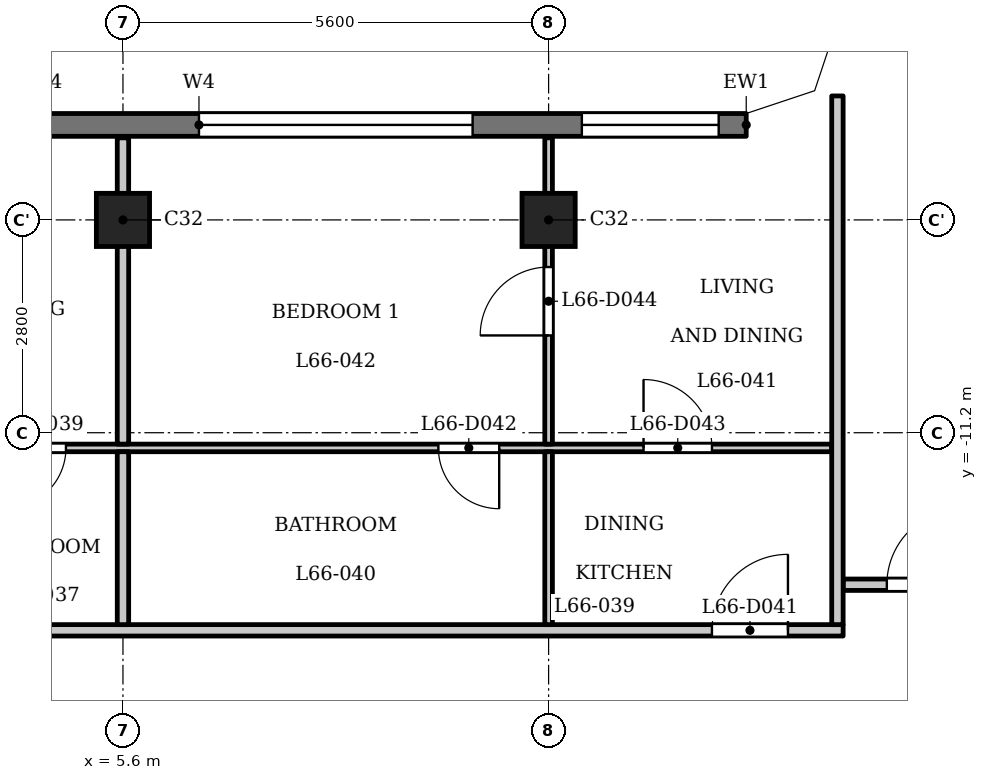
"""IFC4 building model, lengths in metres.
Left out: names, types, materials, properties, quantities, classifications, styles, units other than length and angle.
Written with IfcOpenShell. Run it as: python <this file> out.ifc"""

import sys

from ifc_helpers import new_model, si_unit, direction, frame, frame_2d, origin, origin_2d, place, context, subcontext, project, spatial, polyline, rectangle, outline, extrude, element, fill, save


model = new_model("IFC4")
c1 = context("Model", 3, precision=1e-05, world=origin(), true_north=direction((0.0, 1.0)))
c2 = subcontext(c1, "Body", "Model", "MODEL_VIEW")
j1 = project(units=[si_unit("LENGTHUNIT", "METRE"), si_unit("PLANEANGLEUNIT", "RADIAN")], contexts=[c1])
p1 = place(None, origin())
s1 = spatial("IfcSite", under=j1, at=p1, CompositionType="ELEMENT")
p2 = place(p1, origin())
s2 = spatial("IfcBuilding", under=s1, at=p2, CompositionType="ELEMENT")
p3 = place(p2, frame((0.0, 0.0, 255.7)))
s3 = spatial("IfcBuildingStorey", under=s2, at=p3, CompositionType="ELEMENT", Elevation=255.7)
for number, where, z_axis, x_axis in (
    (1, (5.6, -8.4, 0.0), (0.0, 0.0, 1.0), (1.0, 0.0, 0.0)),
    (2, (11.2, -8.4, 0.0), (0.0, 0.0, 1.0), (1.0, 0.0, 0.0)),
):
    element("IfcColumn", number, at=place(p3, frame(where, z_axis=z_axis, x_axis=x_axis)), inside=s3, PredefinedType="COLUMN", context=c2, shape_type="SweptSolid", body=[
        extrude(rectangle(XDim=0.7, YDim=0.7, at=origin_2d()), origin(), (0.0, 0.0, 1.0), 3.5),
    ])
p4 = place(p3, frame((13.8, -7.15, 0.0), z_axis=(0.0, 0.0, 1.0), x_axis=(-1.0, 0.0, 0.0)))
e3 = element("IfcWall", 3, at=p4, inside=s3, PredefinedType="SOLIDWALL", context=c2, shape_type="SweptSolid", body=[
    extrude(rectangle(XDim=27.6, YDim=0.3, at=frame_2d((13.8, 0.0))), origin(), (0.0, 0.0, 1.0), 3.2),
])
p5 = place(p4, frame((0.363, 0.0, 0.9)))
e4 = element("IfcOpeningElement", 4, at=p5, cuts=e3, PredefinedType="OPENING", context=c2, shape_type="SweptSolid", body=[
    extrude(rectangle(XDim=1.8, YDim=1.25, at=frame_2d((0.9, 0.625))), frame((0.0, 0.16, 0.0), z_axis=(0.0, -1.0, 0.0), x_axis=(1.0, 0.0, 0.0)), (0.0, 0.0, 1.0), 0.32),
])
p6 = place(p4, frame((3.6, 0.0, 1.2)))
e5 = element("IfcOpeningElement", 5, at=p6, cuts=e3, PredefinedType="OPENING", context=c2, shape_type="SweptSolid", body=[
    extrude(rectangle(XDim=3.6, YDim=0.95, at=frame_2d((1.8, 0.475))), frame((0.0, 0.16, 0.0), z_axis=(0.0, -1.0, 0.0), x_axis=(1.0, 0.0, 0.0)), (0.0, 0.0, 1.0), 0.32),
])
p7 = place(p4, frame((9.2, 0.0, 1.2)))
e6 = element("IfcOpeningElement", 6, at=p7, cuts=e3, PredefinedType="OPENING", context=c2, shape_type="SweptSolid", body=[
    extrude(rectangle(XDim=3.6, YDim=0.95, at=frame_2d((1.8, 0.475))), frame((0.0, 0.16, 0.0), z_axis=(0.0, -1.0, 0.0), x_axis=(1.0, 0.0, 0.0)), (0.0, 0.0, 1.0), 0.32),
])
p8 = place(p4, frame((14.8, 0.0, 1.2)))
e7 = element("IfcOpeningElement", 7, at=p8, cuts=e3, PredefinedType="OPENING", context=c2, shape_type="SweptSolid", body=[
    extrude(rectangle(XDim=3.6, YDim=0.95, at=frame_2d((1.8, 0.475))), frame((0.0, 0.16, 0.0), z_axis=(0.0, -1.0, 0.0), x_axis=(1.0, 0.0, 0.0)), (0.0, 0.0, 1.0), 0.32),
])
p9 = place(p4, frame((20.4, 0.0, 1.2)))
e8 = element("IfcOpeningElement", 8, at=p9, cuts=e3, PredefinedType="OPENING", context=c2, shape_type="SweptSolid", body=[
    extrude(rectangle(XDim=3.6, YDim=0.95, at=frame_2d((1.8, 0.475))), frame((0.0, 0.16, 0.0), z_axis=(0.0, -1.0, 0.0), x_axis=(1.0, 0.0, 0.0)), (0.0, 0.0, 1.0), 0.32),
])
p10 = place(p4, frame((25.438, 0.0, 0.9)))
e9 = element("IfcOpeningElement", 9, at=p10, cuts=e3, PredefinedType="OPENING", context=c2, shape_type="SweptSolid", body=[
    extrude(rectangle(XDim=1.8, YDim=1.25, at=frame_2d((0.9, 0.625))), frame((0.0, 0.16, 0.0), z_axis=(0.0, -1.0, 0.0), x_axis=(1.0, 0.0, 0.0)), (0.0, 0.0, 1.0), 0.32),
])
p11 = place(p3, frame((-15.075, -13.8, 0.0), z_axis=(0.0, 0.0, 1.0), x_axis=(1.0, 0.0, 0.0)))
e10 = element("IfcWall", 10, at=p11, inside=s3, PredefinedType="PARTITIONING", context=c2, shape_type="SweptSolid", body=[
    extrude(rectangle(XDim=30.15, YDim=0.15, at=frame_2d((15.075, 0.0))), origin(), (0.0, 0.0, 1.0), 3.2),
])
p12 = place(p11, frame((7.825, 0.0, 0.0)))
e11 = element("IfcOpeningElement", 11, at=p12, cuts=e10, PredefinedType="OPENING", context=c2, shape_type="SweptSolid", body=[
    extrude(rectangle(XDim=1.0, YDim=2.1, at=frame_2d((0.5, 1.05))), frame((0.0, 0.085, 0.0), z_axis=(0.0, -1.0, 0.0), x_axis=(1.0, 0.0, 0.0)), (0.0, 0.0, 1.0), 0.17),
])
p13 = place(p11, frame((11.225, 0.0, 0.0)))
e12 = element("IfcOpeningElement", 12, at=p13, cuts=e10, PredefinedType="OPENING", context=c2, shape_type="SweptSolid", body=[
    extrude(rectangle(XDim=1.0, YDim=2.1, at=frame_2d((0.5, 1.05))), frame((0.0, 0.085, 0.0), z_axis=(0.0, -1.0, 0.0), x_axis=(1.0, 0.0, 0.0)), (0.0, 0.0, 1.0), 0.17),
])
p14 = place(p11, frame((15.575, 0.0, 0.0)))
e13 = element("IfcOpeningElement", 13, at=p14, cuts=e10, PredefinedType="OPENING", context=c2, shape_type="SweptSolid", body=[
    extrude(rectangle(XDim=1.0, YDim=2.1, at=frame_2d((0.5, 1.05))), frame((0.0, 0.085, 0.0), z_axis=(0.0, -1.0, 0.0), x_axis=(1.0, 0.0, 0.0)), (0.0, 0.0, 1.0), 0.17),
])
p15 = place(p11, frame((28.424, 0.0, 0.0)))
e14 = element("IfcOpeningElement", 14, at=p15, cuts=e10, PredefinedType="OPENING", context=c2, shape_type="SweptSolid", body=[
    extrude(rectangle(XDim=1.0, YDim=2.1, at=frame_2d((0.5, 1.05))), frame((0.0, 0.085, 0.0), z_axis=(0.0, -1.0, 0.0), x_axis=(1.0, 0.0, 0.0)), (0.0, 0.0, 1.0), 0.17),
])
p16 = place(p3, frame((15.075, -13.2, 0.0), z_axis=(0.0, 0.0, 1.0), x_axis=(1.0, 0.0, 0.0)))
e15 = element("IfcWall", 15, at=p16, inside=s3, PredefinedType="PARTITIONING", context=c2, shape_type="SweptSolid", body=[
    extrude(rectangle(XDim=2.325, YDim=0.15, at=frame_2d((1.163, 0.0))), origin(), (0.0, 0.0, 1.0), 3.2),
])
p17 = place(p16, frame((0.575, 0.0, 0.0)))
e16 = element("IfcOpeningElement", 16, at=p17, cuts=e15, PredefinedType="OPENING", context=c2, shape_type="SweptSolid", body=[
    extrude(rectangle(XDim=1.0, YDim=2.1, at=frame_2d((0.5, 1.05))), frame((0.0, 0.085, 0.0), z_axis=(0.0, -1.0, 0.0), x_axis=(1.0, 0.0, 0.0)), (0.0, 0.0, 1.0), 0.17),
])
p18 = place(p3, frame((-14.925, -11.4, 0.0), z_axis=(0.0, 0.0, 1.0), x_axis=(1.0, 0.0, 0.0)))
e17 = element("IfcWall", 17, at=p18, inside=s3, PredefinedType="PARTITIONING", context=c2, shape_type="SweptSolid", body=[
    extrude(rectangle(XDim=29.85, YDim=0.1, at=frame_2d((14.925, 0.0))), origin(), (0.0, 0.0, 1.0), 3.2),
])
p19 = place(p18, frame((2.326, 0.0, 0.0)))
e18 = element("IfcOpeningElement", 18, at=p19, cuts=e17, PredefinedType="OPENING", context=c2, shape_type="SweptSolid", body=[
    extrude(rectangle(XDim=0.8, YDim=2.1, at=frame_2d((0.4, 1.05))), frame((0.0, 0.06, 0.0), z_axis=(0.0, -1.0, 0.0), x_axis=(1.0, 0.0, 0.0)), (0.0, 0.0, 1.0), 0.12),
])
p20 = place(p18, frame((6.775, 0.0, 0.0)))
e19 = element("IfcOpeningElement", 19, at=p20, cuts=e17, PredefinedType="OPENING", context=c2, shape_type="SweptSolid", body=[
    extrude(rectangle(XDim=0.9, YDim=2.1, at=frame_2d((0.45, 1.05))), frame((0.0, 0.06, 0.0), z_axis=(0.0, -1.0, 0.0), x_axis=(1.0, 0.0, 0.0)), (0.0, 0.0, 1.0), 0.12),
])
p21 = place(p18, frame((13.375, 0.0, 0.0)))
e20 = element("IfcOpeningElement", 20, at=p21, cuts=e17, PredefinedType="OPENING", context=c2, shape_type="SweptSolid", body=[
    extrude(rectangle(XDim=0.8, YDim=2.1, at=frame_2d((0.4, 1.05))), frame((0.0, 0.06, 0.0), z_axis=(0.0, -1.0, 0.0), x_axis=(1.0, 0.0, 0.0)), (0.0, 0.0, 1.0), 0.12),
])
p22 = place(p18, frame((10.175, 0.0, 0.0)))
e21 = element("IfcOpeningElement", 21, at=p22, cuts=e17, PredefinedType="OPENING", context=c2, shape_type="SweptSolid", body=[
    extrude(rectangle(XDim=0.9, YDim=2.1, at=frame_2d((0.45, 1.05))), frame((0.0, 0.06, 0.0), z_axis=(0.0, -1.0, 0.0), x_axis=(1.0, 0.0, 0.0)), (0.0, 0.0, 1.0), 0.12),
])
p23 = place(p18, frame((18.975, 0.0, 0.0)))
e22 = element("IfcOpeningElement", 22, at=p23, cuts=e17, PredefinedType="OPENING", context=c2, shape_type="SweptSolid", body=[
    extrude(rectangle(XDim=0.8, YDim=2.1, at=frame_2d((0.4, 1.05))), frame((0.0, 0.06, 0.0), z_axis=(0.0, -1.0, 0.0), x_axis=(1.0, 0.0, 0.0)), (0.0, 0.0, 1.0), 0.12),
])
p24 = place(p18, frame((16.525, 0.0, 0.0)))
e23 = element("IfcOpeningElement", 23, at=p24, cuts=e17, PredefinedType="OPENING", context=c2, shape_type="SweptSolid", body=[
    extrude(rectangle(XDim=0.9, YDim=2.1, at=frame_2d((0.45, 1.05))), frame((0.0, 0.06, 0.0), z_axis=(0.0, -1.0, 0.0), x_axis=(1.0, 0.0, 0.0)), (0.0, 0.0, 1.0), 0.12),
])
p25 = place(p18, frame((24.675, 0.0, 0.0)))
e24 = element("IfcOpeningElement", 24, at=p25, cuts=e17, PredefinedType="OPENING", context=c2, shape_type="SweptSolid", body=[
    extrude(rectangle(XDim=0.8, YDim=2.1, at=frame_2d((0.4, 1.05))), frame((0.0, 0.06, 0.0), z_axis=(0.0, -1.0, 0.0), x_axis=(1.0, 0.0, 0.0)), (0.0, 0.0, 1.0), 0.12),
])
p26 = place(p18, frame((27.374, 0.0, 0.0)))
e25 = element("IfcOpeningElement", 25, at=p26, cuts=e17, PredefinedType="OPENING", context=c2, shape_type="SweptSolid", body=[
    extrude(rectangle(XDim=0.9, YDim=2.1, at=frame_2d((0.45, 1.05))), frame((0.0, 0.06, 0.0), z_axis=(0.0, -1.0, 0.0), x_axis=(1.0, 0.0, 0.0)), (0.0, 0.0, 1.0), 0.12),
])
p27 = place(p3, frame((5.6, -13.725, 0.0), z_axis=(0.0, 0.0, 1.0), x_axis=(0.0, 1.0, 0.0)))
e26 = element("IfcWall", 26, at=p27, inside=s3, PredefinedType="PARTITIONING", context=c2, shape_type="SweptSolid", body=[
    extrude(rectangle(XDim=2.275, YDim=0.15, at=frame_2d((1.138, 0.0))), origin(), (0.0, 0.0, 1.0), 3.2),
])
p28 = place(p3, frame((5.6, -11.35, 0.0), z_axis=(0.0, 0.0, 1.0), x_axis=(0.0, 1.0, 0.0)))
e27 = element("IfcWall", 27, at=p28, inside=s3, PredefinedType="PARTITIONING", context=c2, shape_type="SweptSolid", body=[
    extrude(rectangle(XDim=4.03, YDim=0.15, at=frame_2d((2.015, 0.0))), origin(), (0.0, 0.0, 1.0), 3.2),
])
p29 = place(p3, frame((11.2, -13.725, 0.0), z_axis=(0.0, 0.0, 1.0), x_axis=(0.0, 1.0, 0.0)))
e28 = element("IfcWall", 28, at=p29, inside=s3, PredefinedType="PARTITIONING", context=c2, shape_type="SweptSolid", body=[
    extrude(rectangle(XDim=2.275, YDim=0.1, at=frame_2d((1.138, 0.0))), origin(), (0.0, 0.0, 1.0), 3.2),
])
p30 = place(p3, frame((11.2, -11.35, 0.0), z_axis=(0.0, 0.0, 1.0), x_axis=(0.0, 1.0, 0.0)))
e29 = element("IfcWall", 29, at=p30, inside=s3, PredefinedType="PARTITIONING", context=c2, shape_type="SweptSolid", body=[
    extrude(rectangle(XDim=4.03, YDim=0.1, at=frame_2d((2.015, 0.0))), origin(), (0.0, 0.0, 1.0), 3.2),
])
p31 = place(p30, frame((1.43, 0.0, 0.0)))
e30 = element("IfcOpeningElement", 30, at=p31, cuts=e29, PredefinedType="OPENING", context=c2, shape_type="SweptSolid", body=[
    extrude(rectangle(XDim=0.9, YDim=2.1, at=frame_2d((0.45, 1.05))), frame((0.0, 0.06, 0.0), z_axis=(0.0, -1.0, 0.0), x_axis=(1.0, 0.0, 0.0)), (0.0, 0.0, 1.0), 0.12),
])
p32 = place(p3, frame((15.0, -13.725, 0.0), z_axis=(0.0, 0.0, 1.0), x_axis=(0.0, 1.0, 0.0)))
e31 = element("IfcWall", 31, at=p32, inside=s3, PredefinedType="PARTITIONING", context=c2, shape_type="SweptSolid", body=[
    extrude(rectangle(XDim=6.956, YDim=0.15, at=frame_2d((3.478, 0.0))), origin(), (0.0, 0.0, 1.0), 3.2),
])
p33 = place(p3, origin())
e32 = element("IfcWall", 32, at=p33, inside=s3, PredefinedType="SOLIDWALL", context=c2, shape_type="SweptSolid", body=[
    extrude(outline(polyline([(14.937, -6.937), (15.3, -5.849), (15.3, -5.8), (15.0, -5.8), (14.7, -6.7), (13.8, -7.0), (13.8, -7.3), (13.849, -7.3), (14.937, -6.937)])), origin(), (0.0, 0.0, 1.0), 3.2),
])
p34 = place(p17, origin())
e33 = element("IfcDoor", 33, at=p34, inside=s3, OperationType="SINGLE_SWING_LEFT", PredefinedType="DOOR", context=c2, shape_type="SweptSolid", body=[
    extrude(rectangle(XDim=1.0, YDim=2.1, at=frame_2d((0.5, 1.05))), frame((0.0, 0.025, 0.0), z_axis=(0.0, -1.0, 0.0), x_axis=(1.0, 0.0, 0.0)), (0.0, 0.0, 1.0), 0.05),
])
fill(e16, e33)
p35 = place(p23, origin())
e34 = element("IfcDoor", 34, at=p35, inside=s3, OperationType="SINGLE_SWING_LEFT", PredefinedType="DOOR", context=c2, shape_type="SweptSolid", body=[
    extrude(rectangle(XDim=0.8, YDim=2.1, at=frame_2d((0.4, 1.05))), frame((0.0, 0.025, 0.0), z_axis=(0.0, -1.0, 0.0), x_axis=(1.0, 0.0, 0.0)), (0.0, 0.0, 1.0), 0.05),
])
fill(e22, e34)
p36 = place(p15, origin())
e35 = element("IfcDoor", 35, at=p36, inside=s3, OperationType="SINGLE_SWING_LEFT", PredefinedType="DOOR", context=c2, shape_type="SweptSolid", body=[
    extrude(rectangle(XDim=1.0, YDim=2.1, at=frame_2d((0.5, 1.05))), frame((0.0, 0.025, 0.0), z_axis=(0.0, -1.0, 0.0), x_axis=(1.0, 0.0, 0.0)), (0.0, 0.0, 1.0), 0.05),
])
fill(e14, e35)
p37 = place(p25, origin())
e36 = element("IfcDoor", 36, at=p37, inside=s3, OperationType="SINGLE_SWING_RIGHT", PredefinedType="DOOR", context=c2, shape_type="SweptSolid", body=[
    extrude(rectangle(XDim=0.8, YDim=2.1, at=frame_2d((0.4, 1.05))), frame((0.0, 0.025, 0.0), z_axis=(0.0, -1.0, 0.0), x_axis=(1.0, 0.0, 0.0)), (0.0, 0.0, 1.0), 0.05),
])
fill(e24, e36)
p38 = place(p26, origin())
e37 = element("IfcDoor", 37, at=p38, inside=s3, OperationType="SINGLE_SWING_RIGHT", PredefinedType="DOOR", context=c2, shape_type="SweptSolid", body=[
    extrude(rectangle(XDim=0.9, YDim=2.1, at=frame_2d((0.45, 1.05))), frame((0.0, 0.025, 0.0), z_axis=(0.0, -1.0, 0.0), x_axis=(1.0, 0.0, 0.0)), (0.0, 0.0, 1.0), 0.05),
])
fill(e25, e37)
p39 = place(p31, origin())
e38 = element("IfcDoor", 38, at=p39, inside=s3, OperationType="SINGLE_SWING_RIGHT", PredefinedType="DOOR", context=c2, shape_type="SweptSolid", body=[
    extrude(rectangle(XDim=0.9, YDim=2.1, at=frame_2d((0.45, 1.05))), frame((0.0, 0.025, 0.0), z_axis=(0.0, -1.0, 0.0), x_axis=(1.0, 0.0, 0.0)), (0.0, 0.0, 1.0), 0.05),
])
fill(e30, e38)
p40 = place(p5, origin())
e39 = element("IfcWindow", 39, at=p40, inside=s3, PartitioningType="SINGLE_PANEL", PredefinedType="WINDOW", context=c2, shape_type="SweptSolid", body=[
    extrude(rectangle(XDim=1.8, YDim=1.25, at=frame_2d((0.9, 0.625))), frame((0.0, 0.03, 0.0), z_axis=(0.0, -1.0, 0.0), x_axis=(1.0, 0.0, 0.0)), (0.0, 0.0, 1.0), 0.06),
])
fill(e4, e39)
p41 = place(p6, origin())
e40 = element("IfcWindow", 40, at=p41, inside=s3, PartitioningType="SINGLE_PANEL", PredefinedType="WINDOW", context=c2, shape_type="SweptSolid", body=[
    extrude(rectangle(XDim=3.6, YDim=0.95, at=frame_2d((1.8, 0.475))), frame((0.0, 0.03, 0.0), z_axis=(0.0, -1.0, 0.0), x_axis=(1.0, 0.0, 0.0)), (0.0, 0.0, 1.0), 0.06),
])
fill(e5, e40)
save(model, sys.argv[1])
